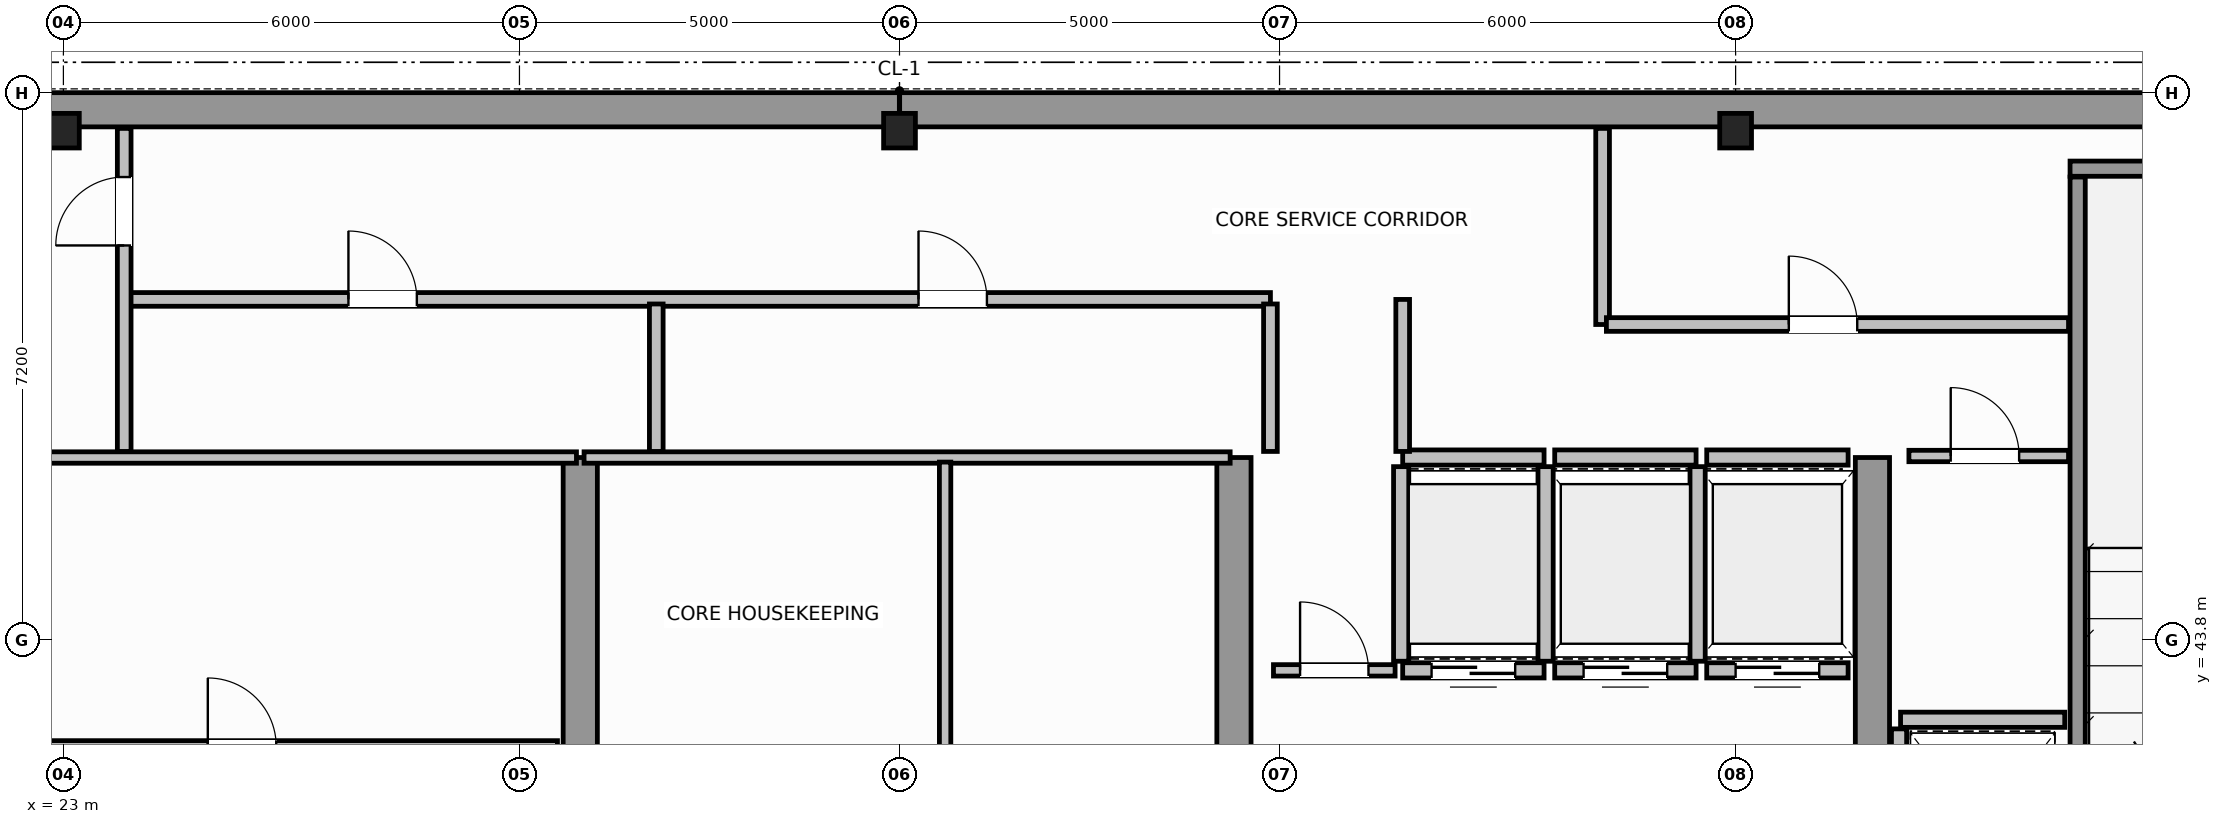
"""IFC4 building model, lengths in metres.
Left out: names, types, materials, properties, quantities, classifications, styles, units other than length and angle.
Written with IfcOpenShell. Run it as: python <this file> out.ifc"""

import sys

from ifc_helpers import new_model, si_unit, direction, frame, frame_2d, origin, origin_2d, place, context, subcontext, project, spatial, rectangle, i_section, extrude, source, transform, mapped, element, fill, save


model = new_model("IFC4")
c1 = context("Model", 3, precision=1e-05, world=origin(), true_north=direction((0.0, 1.0)))
c2 = subcontext(c1, "Body", "Model", "MODEL_VIEW")
j1 = project(units=[si_unit("LENGTHUNIT", "METRE"), si_unit("PLANEANGLEUNIT", "RADIAN")], contexts=[c1])
p1 = place(None, origin())
s1 = spatial("IfcSite", under=j1, at=p1, CompositionType="ELEMENT")
p2 = place(p1, origin())
s2 = spatial("IfcBuilding", under=s1, at=p2, CompositionType="ELEMENT")
p3 = place(p2, frame((0.0, 0.0, 261.2)))
s3 = spatial("IfcBuildingStorey", under=s2, at=p3, CompositionType="ELEMENT", Elevation=261.2)
m1 = source(origin(), c2, "Body", "SweptSolid", [
    extrude(i_section(OverallWidth=0.418, OverallDepth=0.455, WebThickness=0.042, FlangeThickness=0.058, FilletRadius=0.015, at=origin_2d()), origin(), (0.0, 0.0, 1.0), 3.8),
])
for number, where, z_axis, x_axis in (
    (1, (23.0, 50.5, 0.0), (0.0, 0.0, 1.0), (1.0, 0.0, 0.0)),
    (2, (34.0, 50.5, 0.0), (0.0, 0.0, 1.0), (1.0, 0.0, 0.0)),
    (3, (45.0, 50.5, 0.0), (0.0, 0.0, 1.0), (1.0, 0.0, 0.0)),
):
    element("IfcColumn", number, at=place(p3, frame(where, z_axis=z_axis, x_axis=x_axis)), inside=s3, PredefinedType="COLUMN", context=c2, shape_type="MappedRepresentation", body=[
        mapped(m1, transform((0.0, 0.0, 0.0), scale=1.0)),
    ])
for number, where, z_axis, x_axis in (
    (4, (14.229, 50.775, 0.0), (0.0, 0.0, 1.0), (1.0, 0.0, 0.0)),
    (5, (34.002, 50.775, 0.0), (0.0, 0.0, 1.0), (1.0, 0.0, 0.0)),
):
    element("IfcWall", number, at=place(p3, frame(where, z_axis=z_axis, x_axis=x_axis)), inside=s3, PredefinedType="SHEAR", context=c2, shape_type="SweptSolid", body=[
        extrude(rectangle(XDim=19.769, YDim=0.45, at=frame_2d((9.885, 0.0))), origin(), (0.0, 0.0, 1.0), 3.8),
    ])
for number, where, z_axis, x_axis in (
    (6, (29.8, 36.745, 0.0), (0.0, 0.0, 1.0), (0.0, 1.0, 0.0)),
    (7, (38.4, 36.745, 0.0), (0.0, 0.0, 1.0), (0.0, 1.0, 0.0)),
    (8, (46.8, 36.745, 0.0), (0.0, 0.0, 1.0), (0.0, 1.0, 0.0)),
):
    element("IfcWall", number, at=place(p3, frame(where, z_axis=z_axis, x_axis=x_axis)), inside=s3, PredefinedType="SHEAR", context=c2, shape_type="SweptSolid", body=[
        extrude(rectangle(XDim=9.455, YDim=0.45, at=frame_2d((4.728, 0.0))), origin(), (0.0, 0.0, 1.0), 3.8),
    ])
p4 = place(p3, frame((49.4, 50.0, 0.0), z_axis=(0.0, 0.0, 1.0), x_axis=(1.0, 0.0, 0.0)))
e9 = element("IfcWall", 9, at=p4, inside=s3, PredefinedType="SOLIDWALL", context=c2, shape_type="SweptSolid", body=[
    extrude(rectangle(XDim=4.375, YDim=0.2, at=frame_2d((2.188, 0.0))), origin(), (0.0, 0.0, 1.0), 3.8),
])
p5 = place(p3, frame((49.5, 39.96, 0.0), z_axis=(0.0, 0.0, 1.0), x_axis=(0.0, 1.0, 0.0)))
e10 = element("IfcWall", 10, at=p5, inside=s3, PredefinedType="SOLIDWALL", context=c2, shape_type="SweptSolid", body=[
    extrude(rectangle(XDim=9.93, YDim=0.2, at=frame_2d((4.965, 0.0))), origin(), (0.0, 0.0, 1.0), 3.8),
])
p6 = place(p3, frame((40.62, 43.4, 0.0), z_axis=(0.0, 0.0, 1.0), x_axis=(1.0, 0.0, 0.0)))
e11 = element("IfcWall", 11, at=p6, inside=s3, PredefinedType="SOLIDWALL", context=c2, shape_type="SweptSolid", body=[
    extrude(rectangle(XDim=1.86, YDim=0.2, at=frame_2d((0.93, 0.0))), origin(), (0.0, 0.0, 1.0), 3.58),
])
p7 = place(p6, frame((0.38, 0.0, 0.0)))
e12 = element("IfcOpeningElement", 12, at=p7, cuts=e11, PredefinedType="OPENING", context=c2, shape_type="SweptSolid", body=[
    extrude(rectangle(XDim=1.1, YDim=2.15, at=frame_2d((0.55, 1.075))), frame((0.0, 0.11, 0.0), z_axis=(0.0, -1.0, 0.0), x_axis=(1.0, 0.0, 0.0)), (0.0, 0.0, 1.0), 0.22),
])
p8 = place(p3, frame((40.62, 46.2, 0.0), z_axis=(0.0, 0.0, 1.0), x_axis=(1.0, 0.0, 0.0)))
e13 = element("IfcWall", 13, at=p8, inside=s3, PredefinedType="SOLIDWALL", context=c2, shape_type="SweptSolid", body=[
    extrude(rectangle(XDim=1.86, YDim=0.2, at=frame_2d((0.93, 0.0))), origin(), (0.0, 0.0, 1.0), 3.58),
])
for number, where, z_axis, x_axis in (
    (14, (40.6, 43.52, 0.0), (0.0, 0.0, 1.0), (0.0, 1.0, 0.0)),
    (15, (42.5, 43.52, 0.0), (0.0, 0.0, 1.0), (0.0, 1.0, 0.0)),
):
    element("IfcWall", number, at=place(p3, frame(where, z_axis=z_axis, x_axis=x_axis)), inside=s3, PredefinedType="SOLIDWALL", context=c2, shape_type="SweptSolid", body=[
        extrude(rectangle(XDim=2.56, YDim=0.2, at=frame_2d((1.28, 0.0))), origin(), (0.0, 0.0, 1.0), 3.58),
    ])
p9 = place(p3, frame((42.62, 43.4, 0.0), z_axis=(0.0, 0.0, 1.0), x_axis=(1.0, 0.0, 0.0)))
e16 = element("IfcWall", 16, at=p9, inside=s3, PredefinedType="SOLIDWALL", context=c2, shape_type="SweptSolid", body=[
    extrude(rectangle(XDim=1.86, YDim=0.2, at=frame_2d((0.93, 0.0))), origin(), (0.0, 0.0, 1.0), 3.58),
])
p10 = place(p9, frame((0.38, 0.0, 0.0)))
e17 = element("IfcOpeningElement", 17, at=p10, cuts=e16, PredefinedType="OPENING", context=c2, shape_type="SweptSolid", body=[
    extrude(rectangle(XDim=1.1, YDim=2.15, at=frame_2d((0.55, 1.075))), frame((0.0, 0.11, 0.0), z_axis=(0.0, -1.0, 0.0), x_axis=(1.0, 0.0, 0.0)), (0.0, 0.0, 1.0), 0.22),
])
p11 = place(p3, frame((42.62, 46.2, 0.0), z_axis=(0.0, 0.0, 1.0), x_axis=(1.0, 0.0, 0.0)))
e18 = element("IfcWall", 18, at=p11, inside=s3, PredefinedType="SOLIDWALL", context=c2, shape_type="SweptSolid", body=[
    extrude(rectangle(XDim=1.86, YDim=0.2, at=frame_2d((0.93, 0.0))), origin(), (0.0, 0.0, 1.0), 3.58),
])
p12 = place(p3, frame((44.5, 43.52, 0.0), z_axis=(0.0, 0.0, 1.0), x_axis=(0.0, 1.0, 0.0)))
e19 = element("IfcWall", 19, at=p12, inside=s3, PredefinedType="SOLIDWALL", context=c2, shape_type="SweptSolid", body=[
    extrude(rectangle(XDim=2.56, YDim=0.2, at=frame_2d((1.28, 0.0))), origin(), (0.0, 0.0, 1.0), 3.58),
])
p13 = place(p3, frame((44.62, 43.4, 0.0), z_axis=(0.0, 0.0, 1.0), x_axis=(1.0, 0.0, 0.0)))
e20 = element("IfcWall", 20, at=p13, inside=s3, PredefinedType="SOLIDWALL", context=c2, shape_type="SweptSolid", body=[
    extrude(rectangle(XDim=1.86, YDim=0.2, at=frame_2d((0.93, 0.0))), origin(), (0.0, 0.0, 1.0), 3.58),
])
p14 = place(p13, frame((0.38, 0.0, 0.0)))
e21 = element("IfcOpeningElement", 21, at=p14, cuts=e20, PredefinedType="OPENING", context=c2, shape_type="SweptSolid", body=[
    extrude(rectangle(XDim=1.1, YDim=2.15, at=frame_2d((0.55, 1.075))), frame((0.0, 0.11, 0.0), z_axis=(0.0, -1.0, 0.0), x_axis=(1.0, 0.0, 0.0)), (0.0, 0.0, 1.0), 0.22),
])
p15 = place(p3, frame((44.62, 46.2, 0.0), z_axis=(0.0, 0.0, 1.0), x_axis=(1.0, 0.0, 0.0)))
e22 = element("IfcWall", 22, at=p15, inside=s3, PredefinedType="SOLIDWALL", context=c2, shape_type="SweptSolid", body=[
    extrude(rectangle(XDim=1.86, YDim=0.2, at=frame_2d((0.93, 0.0))), origin(), (0.0, 0.0, 1.0), 3.58),
])
p16 = place(p3, frame((47.17, 42.75, 0.0), z_axis=(0.0, 0.0, 1.0), x_axis=(1.0, 0.0, 0.0)))
e23 = element("IfcWall", 23, at=p16, inside=s3, PredefinedType="SOLIDWALL", context=c2, shape_type="SweptSolid", body=[
    extrude(rectangle(XDim=2.16, YDim=0.2, at=frame_2d((1.08, 0.0))), origin(), (0.0, 0.0, 1.0), 3.58),
])
p17 = place(p3, frame((47.15, 40.07, 0.0), z_axis=(0.0, 0.0, 1.0), x_axis=(0.0, 1.0, 0.0)))
e24 = element("IfcWall", 24, at=p17, inside=s3, PredefinedType="SOLIDWALL", context=c2, shape_type="SweptSolid", body=[
    extrude(rectangle(XDim=2.56, YDim=0.2, at=frame_2d((1.28, 0.0))), origin(), (0.0, 0.0, 1.0), 3.58),
])
p18 = place(p3, frame((21.25, 46.2, 0.0), z_axis=(0.0, 0.0, 1.0), x_axis=(1.0, 0.0, 0.0)))
e25 = element("IfcWall", 25, at=p18, inside=s3, PredefinedType="PARTITIONING", context=c2, shape_type="SweptSolid", body=[
    extrude(rectangle(XDim=8.5, YDim=0.15, at=frame_2d((4.25, 0.0))), origin(), (0.0, 0.0, 1.0), 3.58),
])
p19 = place(p3, frame((21.5, 42.4, 0.0), z_axis=(0.0, 0.0, 1.0), x_axis=(1.0, 0.0, 0.0)))
e26 = element("IfcWall", 26, at=p19, inside=s3, PredefinedType="PARTITIONING", context=c2, shape_type="SweptSolid", body=[
    extrude(rectangle(XDim=8.0, YDim=0.15, at=frame_2d((4.0, 0.0))), origin(), (0.0, 0.0, 1.0), 3.58),
])
p20 = place(p19, frame((3.4, 0.0, 0.0)))
e27 = element("IfcOpeningElement", 27, at=p20, cuts=e26, PredefinedType="OPENING", context=c2, shape_type="SweptSolid", body=[
    extrude(rectangle(XDim=0.9, YDim=2.1, at=frame_2d((0.45, 1.05))), frame((0.0, 0.085, 0.0), z_axis=(0.0, -1.0, 0.0), x_axis=(1.0, 0.0, 0.0)), (0.0, 0.0, 1.0), 0.17),
])
p21 = place(p3, frame((29.85, 46.2, 0.0), z_axis=(0.0, 0.0, 1.0), x_axis=(1.0, 0.0, 0.0)))
e28 = element("IfcWall", 28, at=p21, inside=s3, PredefinedType="PARTITIONING", context=c2, shape_type="SweptSolid", body=[
    extrude(rectangle(XDim=8.5, YDim=0.15, at=frame_2d((4.25, 0.0))), origin(), (0.0, 0.0, 1.0), 3.58),
])
p22 = place(p3, frame((34.6, 36.56, 0.0), z_axis=(0.0, 0.0, 1.0), x_axis=(0.0, 1.0, 0.0)))
e29 = element("IfcWall", 29, at=p22, inside=s3, PredefinedType="PARTITIONING", context=c2, shape_type="SweptSolid", body=[
    extrude(rectangle(XDim=9.58, YDim=0.15, at=frame_2d((4.79, 0.0))), origin(), (0.0, 0.0, 1.0), 3.58),
])
p23 = place(p22, frame((4.2, 0.0, 0.0)))
e30 = element("IfcOpeningElement", 30, at=p23, cuts=e29, PredefinedType="OPENING", context=c2, shape_type="SweptSolid", body=[
    extrude(rectangle(XDim=0.9, YDim=2.1, at=frame_2d((0.45, 1.05))), frame((0.0, 0.085, 0.0), z_axis=(0.0, -1.0, 0.0), x_axis=(1.0, 0.0, 0.0)), (0.0, 0.0, 1.0), 0.17),
])
p24 = place(p3, frame((47.28, 46.22, 0.0), z_axis=(0.0, 0.0, 1.0), x_axis=(1.0, 0.0, 0.0)))
e31 = element("IfcWall", 31, at=p24, inside=s3, PredefinedType="PARTITIONING", context=c2, shape_type="SweptSolid", body=[
    extrude(rectangle(XDim=2.1, YDim=0.15, at=frame_2d((1.05, 0.0))), origin(), (0.0, 0.0, 1.0), 3.58),
])
p25 = place(p24, frame((0.55, 0.0, 0.0)))
e32 = element("IfcOpeningElement", 32, at=p25, cuts=e31, PredefinedType="OPENING", context=c2, shape_type="SweptSolid", body=[
    extrude(rectangle(XDim=0.9, YDim=2.1, at=frame_2d((0.45, 1.05))), frame((0.0, 0.085, 0.0), z_axis=(0.0, -1.0, 0.0), x_axis=(1.0, 0.0, 0.0)), (0.0, 0.0, 1.0), 0.17),
])
p26 = place(p3, frame((38.92, 43.4, 0.0), z_axis=(0.0, 0.0, 1.0), x_axis=(1.0, 0.0, 0.0)))
e33 = element("IfcWall", 33, at=p26, inside=s3, PredefinedType="PARTITIONING", context=c2, shape_type="SweptSolid", body=[
    extrude(rectangle(XDim=1.6, YDim=0.15, at=frame_2d((0.8, 0.0))), origin(), (0.0, 0.0, 1.0), 3.58),
])
p27 = place(p26, frame((0.35, 0.0, 0.0)))
e34 = element("IfcOpeningElement", 34, at=p27, cuts=e33, PredefinedType="OPENING", context=c2, shape_type="SweptSolid", body=[
    extrude(rectangle(XDim=0.9, YDim=2.1, at=frame_2d((0.45, 1.05))), frame((0.0, 0.085, 0.0), z_axis=(0.0, -1.0, 0.0), x_axis=(1.0, 0.0, 0.0)), (0.0, 0.0, 1.0), 0.17),
])
p28 = place(p3, frame((23.85, 48.28, 0.0), z_axis=(0.0, 0.0, 1.0), x_axis=(1.0, 0.0, 0.0)))
e35 = element("IfcWall", 35, at=p28, inside=s3, PredefinedType="PLUMBINGWALL", context=c2, shape_type="SweptSolid", body=[
    extrude(rectangle(XDim=15.03, YDim=0.18, at=frame_2d((7.515, 0.0))), origin(), (0.0, 0.0, 1.0), 3.58),
])
p29 = place(p28, frame((2.9, 0.0, 0.0)))
e36 = element("IfcOpeningElement", 36, at=p29, cuts=e35, PredefinedType="OPENING", context=c2, shape_type="SweptSolid", body=[
    extrude(rectangle(XDim=0.9, YDim=2.15, at=frame_2d((0.45, 1.075))), frame((0.0, 0.1, 0.0), z_axis=(0.0, -1.0, 0.0), x_axis=(1.0, 0.0, 0.0)), (0.0, 0.0, 1.0), 0.2),
])
p30 = place(p28, frame((10.4, 0.0, 0.0)))
e37 = element("IfcOpeningElement", 37, at=p30, cuts=e35, PredefinedType="OPENING", context=c2, shape_type="SweptSolid", body=[
    extrude(rectangle(XDim=0.9, YDim=2.15, at=frame_2d((0.45, 1.075))), frame((0.0, 0.1, 0.0), z_axis=(0.0, -1.0, 0.0), x_axis=(1.0, 0.0, 0.0)), (0.0, 0.0, 1.0), 0.2),
])
p31 = place(p3, frame((23.8, 46.28, 0.0), z_axis=(0.0, 0.0, 1.0), x_axis=(0.0, 1.0, 0.0)))
e38 = element("IfcWall", 38, at=p31, inside=s3, PredefinedType="PLUMBINGWALL", context=c2, shape_type="SweptSolid", body=[
    extrude(rectangle(XDim=4.25, YDim=0.18, at=frame_2d((2.125, 0.0))), origin(), (0.0, 0.0, 1.0), 3.58),
])
p32 = place(p31, frame((2.71, 0.0, 0.0)))
e39 = element("IfcOpeningElement", 39, at=p32, cuts=e38, PredefinedType="OPENING", context=c2, shape_type="SweptSolid", body=[
    extrude(rectangle(XDim=0.9, YDim=2.15, at=frame_2d((0.45, 1.075))), frame((0.0, 0.1, 0.0), z_axis=(0.0, -1.0, 0.0), x_axis=(1.0, 0.0, 0.0)), (0.0, 0.0, 1.0), 0.2),
])
for number, where, z_axis, x_axis in (
    (40, (30.8, 46.28, 0.0), (0.0, 0.0, 1.0), (0.0, 1.0, 0.0)),
    (41, (38.88, 46.28, 0.0), (0.0, 0.0, 1.0), (0.0, 1.0, 0.0)),
):
    element("IfcWall", number, at=place(p3, frame(where, z_axis=z_axis, x_axis=x_axis)), inside=s3, PredefinedType="PLUMBINGWALL", context=c2, shape_type="SweptSolid", body=[
        extrude(rectangle(XDim=1.94, YDim=0.18, at=frame_2d((0.97, 0.0))), origin(), (0.0, 0.0, 1.0), 3.58),
    ])
p33 = place(p3, frame((40.62, 46.28, 0.0), z_axis=(0.0, 0.0, 1.0), x_axis=(0.0, 1.0, 0.0)))
e42 = element("IfcWall", 42, at=p33, inside=s3, PredefinedType="PLUMBINGWALL", context=c2, shape_type="SweptSolid", body=[
    extrude(rectangle(XDim=2.0, YDim=0.18, at=frame_2d((1.0, 0.0))), origin(), (0.0, 0.0, 1.0), 3.58),
])
p34 = place(p3, frame((43.25, 47.95, 0.0), z_axis=(0.0, 0.0, 1.0), x_axis=(0.0, 1.0, 0.0)))
e43 = element("IfcWall", 43, at=p34, inside=s3, PredefinedType="PLUMBINGWALL", context=c2, shape_type="SweptSolid", body=[
    extrude(rectangle(XDim=2.58, YDim=0.18, at=frame_2d((1.29, 0.0))), origin(), (0.0, 0.0, 1.0), 3.58),
])
p35 = place(p3, frame((43.3, 47.95, 0.0), z_axis=(0.0, 0.0, 1.0), x_axis=(1.0, 0.0, 0.0)))
e44 = element("IfcWall", 44, at=p35, inside=s3, PredefinedType="PLUMBINGWALL", context=c2, shape_type="SweptSolid", body=[
    extrude(rectangle(XDim=6.08, YDim=0.18, at=frame_2d((3.04, 0.0))), origin(), (0.0, 0.0, 1.0), 3.58),
])
p36 = place(p35, frame((2.4, 0.0, 0.0)))
e45 = element("IfcOpeningElement", 45, at=p36, cuts=e44, PredefinedType="OPENING", context=c2, shape_type="SweptSolid", body=[
    extrude(rectangle(XDim=0.9, YDim=2.15, at=frame_2d((0.45, 1.075))), frame((0.0, 0.1, 0.0), z_axis=(0.0, -1.0, 0.0), x_axis=(1.0, 0.0, 0.0)), (0.0, 0.0, 1.0), 0.2),
])
m2 = source(origin(), c2, "Body", "SweptSolid", [
    extrude(rectangle(XDim=1.1, YDim=2.15, at=frame_2d((0.55, 1.075))), frame((0.0, 0.025, 0.0), z_axis=(0.0, -1.0, 0.0), x_axis=(1.0, 0.0, 0.0)), (0.0, 0.0, 1.0), 0.05),
])
p37 = place(p7, origin())
e46 = element("IfcDoor", 46, at=p37, inside=s3, OperationType="DOUBLE_DOOR_SLIDING", PredefinedType="DOOR", context=c2, shape_type="MappedRepresentation", body=[
    mapped(m2, transform((0.0, 0.0, 0.0), scale=1.0)),
])
fill(e12, e46)
p38 = place(p10, origin())
e47 = element("IfcDoor", 47, at=p38, inside=s3, OperationType="DOUBLE_DOOR_SLIDING", PredefinedType="DOOR", context=c2, shape_type="MappedRepresentation", body=[
    mapped(m2, transform((0.0, 0.0, 0.0), scale=1.0)),
])
fill(e17, e47)
p39 = place(p14, origin())
e48 = element("IfcDoor", 48, at=p39, inside=s3, OperationType="DOUBLE_DOOR_SLIDING", PredefinedType="DOOR", context=c2, shape_type="MappedRepresentation", body=[
    mapped(m2, transform((0.0, 0.0, 0.0), scale=1.0)),
])
fill(e21, e48)
m3 = source(origin(), c2, "Body", "SweptSolid", [
    extrude(rectangle(XDim=0.9, YDim=2.1, at=frame_2d((0.45, 1.05))), frame((0.0, 0.025, 0.0), z_axis=(0.0, -1.0, 0.0), x_axis=(1.0, 0.0, 0.0)), (0.0, 0.0, 1.0), 0.05),
])
p40 = place(p20, origin())
e49 = element("IfcDoor", 49, at=p40, inside=s3, OperationType="SINGLE_SWING_RIGHT", PredefinedType="DOOR", context=c2, shape_type="MappedRepresentation", body=[
    mapped(m3, transform((0.0, 0.0, 0.0), scale=1.0)),
])
fill(e27, e49)
p41 = place(p25, origin())
e50 = element("IfcDoor", 50, at=p41, inside=s3, OperationType="SINGLE_SWING_RIGHT", PredefinedType="DOOR", context=c2, shape_type="MappedRepresentation", body=[
    mapped(m3, transform((0.0, 0.0, 0.0), scale=1.0)),
])
fill(e32, e50)
p42 = place(p27, origin())
e51 = element("IfcDoor", 51, at=p42, inside=s3, OperationType="SINGLE_SWING_LEFT", PredefinedType="DOOR", context=c2, shape_type="MappedRepresentation", body=[
    mapped(m3, transform((0.0, 0.0, 0.0), scale=1.0)),
])
fill(e34, e51)
m4 = source(origin(), c2, "Body", "SweptSolid", [
    extrude(rectangle(XDim=0.9, YDim=2.15, at=frame_2d((0.45, 1.075))), frame((0.0, 0.025, 0.0), z_axis=(0.0, -1.0, 0.0), x_axis=(1.0, 0.0, 0.0)), (0.0, 0.0, 1.0), 0.05),
])
p43 = place(p32, origin())
e52 = element("IfcDoor", 52, at=p43, inside=s3, OperationType="SINGLE_SWING_LEFT", PredefinedType="DOOR", context=c2, shape_type="MappedRepresentation", body=[
    mapped(m4, transform((0.0, 0.0, 0.0), scale=1.0)),
])
fill(e39, e52)
p44 = place(p29, origin())
e53 = element("IfcDoor", 53, at=p44, inside=s3, OperationType="SINGLE_SWING_RIGHT", PredefinedType="DOOR", context=c2, shape_type="MappedRepresentation", body=[
    mapped(m4, transform((0.0, 0.0, 0.0), scale=1.0)),
])
fill(e36, e53)
p45 = place(p30, origin())
e54 = element("IfcDoor", 54, at=p45, inside=s3, OperationType="SINGLE_SWING_LEFT", PredefinedType="DOOR", context=c2, shape_type="MappedRepresentation", body=[
    mapped(m4, transform((0.0, 0.0, 0.0), scale=1.0)),
])
fill(e37, e54)
p46 = place(p36, origin())
e55 = element("IfcDoor", 55, at=p46, inside=s3, OperationType="SINGLE_SWING_RIGHT", PredefinedType="DOOR", context=c2, shape_type="MappedRepresentation", body=[
    mapped(m4, transform((0.0, 0.0, 0.0), scale=1.0)),
])
fill(e45, e55)
save(model, sys.argv[1])
